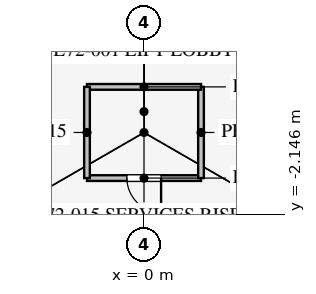
"""IFC4 building model, lengths in metres.
Left out: names, types, materials, properties, quantities, classifications, styles, units other than length and angle.
Written with IfcOpenShell. Run it as: python <this file> out.ifc"""

import sys

from ifc_helpers import new_model, si_unit, direction, frame, frame_2d, origin, place, context, subcontext, project, spatial, rectangle, extrude, element, fill, save


model = new_model("IFC4")
c1 = context("Model", 3, precision=1e-05, world=origin(), true_north=direction((0.0, 1.0)))
c2 = subcontext(c1, "Body", "Model", "MODEL_VIEW")
j1 = project(units=[si_unit("LENGTHUNIT", "METRE"), si_unit("PLANEANGLEUNIT", "RADIAN")], contexts=[c1])
p1 = place(None, origin())
s1 = spatial("IfcSite", under=j1, at=p1, CompositionType="ELEMENT")
p2 = place(p1, origin())
s2 = spatial("IfcBuilding", under=s1, at=p2, CompositionType="ELEMENT")
p3 = place(p2, frame((0.0, 0.0, 314.1)))
s3 = spatial("IfcBuildingStorey", under=s2, at=p3, CompositionType="ELEMENT", Elevation=314.1)
p4 = place(p3, frame((-1.5, -1.2, 0.0), z_axis=(0.0, 0.0, 1.0), x_axis=(1.0, 0.0, 0.0)))
e1 = element("IfcWall", 1, at=p4, inside=s3, PredefinedType="PARTITIONING", context=c2, shape_type="SweptSolid", body=[
    extrude(rectangle(XDim=3.0, YDim=0.15, at=frame_2d((1.5, 0.0))), origin(), (0.0, 0.0, 1.0), 4.0),
])
p5 = place(p4, frame((1.05, 0.0, 0.0)))
e2 = element("IfcOpeningElement", 2, at=p5, cuts=e1, PredefinedType="OPENING", context=c2, shape_type="SweptSolid", body=[
    extrude(rectangle(XDim=0.9, YDim=2.1, at=frame_2d((0.45, 1.05))), frame((0.0, 0.085, 0.0), z_axis=(0.0, -1.0, 0.0), x_axis=(1.0, 0.0, 0.0)), (0.0, 0.0, 1.0), 0.17),
])
p6 = place(p3, frame((1.5, -1.2, 0.0), z_axis=(0.0, 0.0, 1.0), x_axis=(0.0, 1.0, 0.0)))
e3 = element("IfcWall", 3, at=p6, inside=s3, PredefinedType="PARTITIONING", context=c2, shape_type="SweptSolid", body=[
    extrude(rectangle(XDim=2.4, YDim=0.15, at=frame_2d((1.2, 0.0))), origin(), (0.0, 0.0, 1.0), 4.0),
])
p7 = place(p3, frame((1.5, 1.2, 0.0), z_axis=(0.0, 0.0, 1.0), x_axis=(-1.0, 0.0, 0.0)))
e4 = element("IfcWall", 4, at=p7, inside=s3, PredefinedType="PARTITIONING", context=c2, shape_type="SweptSolid", body=[
    extrude(rectangle(XDim=3.0, YDim=0.15, at=frame_2d((1.5, 0.0))), origin(), (0.0, 0.0, 1.0), 4.0),
])
p8 = place(p3, frame((-1.5, 1.2, 0.0), z_axis=(0.0, 0.0, 1.0), x_axis=(0.0, -1.0, 0.0)))
e5 = element("IfcWall", 5, at=p8, inside=s3, PredefinedType="PARTITIONING", context=c2, shape_type="SweptSolid", body=[
    extrude(rectangle(XDim=2.4, YDim=0.15, at=frame_2d((1.2, 0.0))), origin(), (0.0, 0.0, 1.0), 4.0),
])
p9 = place(p5, frame((0.9, 0.0, 0.0), z_axis=(0.0, 0.0, 1.0), x_axis=(-1.0, 0.0, 0.0)))
e6 = element("IfcDoor", 6, at=p9, inside=s3, OperationType="SINGLE_SWING_LEFT", PredefinedType="DOOR", context=c2, shape_type="SweptSolid", body=[
    extrude(rectangle(XDim=0.9, YDim=2.1, at=frame_2d((0.45, 1.05))), frame((0.0, 0.025, 0.0), z_axis=(0.0, -1.0, 0.0), x_axis=(1.0, 0.0, 0.0)), (0.0, 0.0, 1.0), 0.05),
])
fill(e2, e6)
save(model, sys.argv[1])
